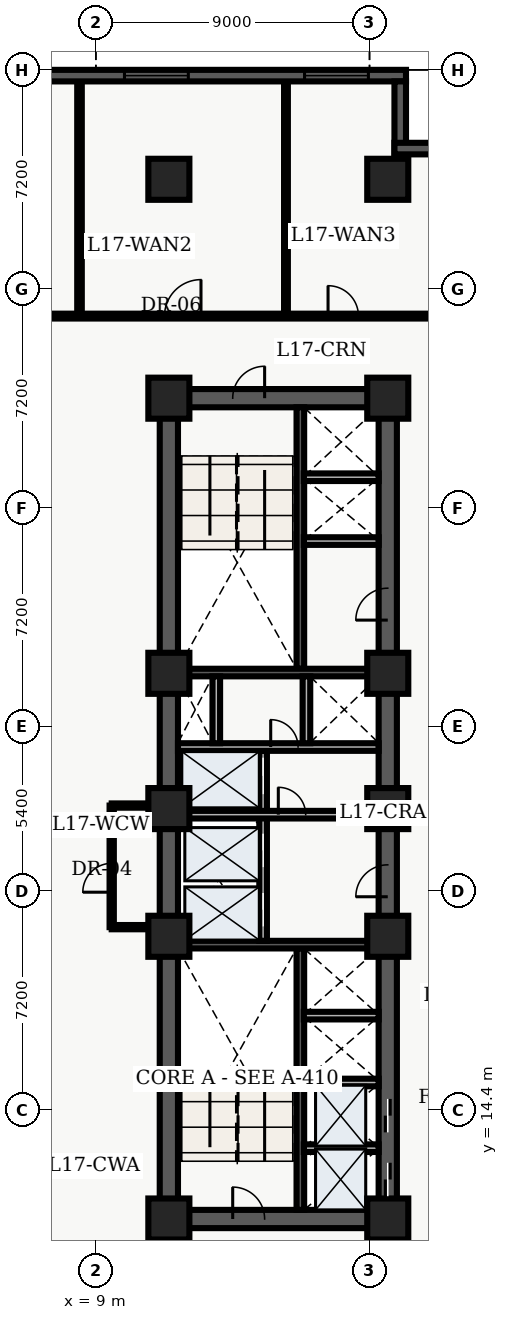
"""IFC4 building model, lengths in metres.
Left out: names, types, materials, properties, quantities, classifications, styles, units other than length and angle.
Written with IfcOpenShell. Run it as: python <this file> out.ifc"""

import sys

from ifc_helpers import new_model, entity, si_unit, converted_unit, direction, frame, origin_with_axes, origin_2d_with_axis, place, context, subcontext, project, spatial, polyline, rectangle, outline, extrude, element, fill, save


model = new_model("IFC4")
c1 = context("Model", 3, precision=1e-05, world=origin_with_axes(), true_north=direction((0.0, 1.0)))
c2 = subcontext(c1, "Body", "Model", "MODEL_VIEW")
j1 = project(units=[si_unit("LENGTHUNIT", "METRE"), converted_unit("PLANEANGLEUNIT", "DEGREE", entity("IfcPlaneAngleMeasure", 0.017), si_unit("PLANEANGLEUNIT", "RADIAN"), dimensions=[0, 0, 0, 0, 0, 0, 0])], contexts=[c1])
p1 = place(None, origin_with_axes())
s1 = spatial("IfcSite", under=j1, at=p1, CompositionType="ELEMENT")
p2 = place(p1, origin_with_axes())
s2 = spatial("IfcBuilding", under=s1, at=p2, CompositionType="ELEMENT")
p3 = place(p2, frame((0.0, 0.0, 71.7), z_axis=(0.0, 0.0, 1.0), x_axis=(1.0, 0.0, 0.0)))
s3 = spatial("IfcBuildingStorey", under=s2, at=p3, CompositionType="ELEMENT", Elevation=71.7)
p4 = place(p3, frame((11.4, 10.8, 0.0), z_axis=(0.0, 0.0, 1.0), x_axis=(0.0, 1.0, 0.0)))
e1 = element("IfcWall", 1, at=p4, inside=s3, PredefinedType="SHEAR", context=c2, shape_type="SweptSolid", body=[
    extrude(outline(polyline([(0.0, -0.3), (27.0, -0.3), (27.0, 0.3), (0.0, 0.3), (0.0, -0.3)])), origin_with_axes(), (0.0, 0.0, 1.0), 3.66),
])
p5 = place(p3, frame((11.4, 10.8, 0.0), z_axis=(0.0, 0.0, 1.0), x_axis=(1.0, 0.0, 0.0)))
e2 = element("IfcWall", 2, at=p5, inside=s3, PredefinedType="SHEAR", context=c2, shape_type="SweptSolid", body=[
    extrude(outline(polyline([(0.0, -0.3), (7.2, -0.3), (7.2, 0.3), (0.0, 0.3), (0.0, -0.3)])), origin_with_axes(), (0.0, 0.0, 1.0), 3.66),
])
p6 = place(p5, frame((2.625, 0.0, 0.0), z_axis=(0.0, 0.0, 1.0), x_axis=(1.0, 0.0, 0.0)))
e3 = element("IfcOpeningElement", 3, at=p6, cuts=e2, PredefinedType="OPENING", context=c2, shape_type="SweptSolid", body=[
    extrude(rectangle(XDim=1.05, YDim=0.62, at=origin_2d_with_axis()), origin_with_axes(), (0.0, 0.0, 1.0), 2.15),
])
p7 = place(p3, frame((11.4, 37.8, 0.0), z_axis=(0.0, 0.0, 1.0), x_axis=(1.0, 0.0, 0.0)))
e4 = element("IfcWall", 4, at=p7, inside=s3, PredefinedType="SHEAR", context=c2, shape_type="SweptSolid", body=[
    extrude(outline(polyline([(0.0, -0.3), (7.2, -0.3), (7.2, 0.3), (0.0, 0.3), (0.0, -0.3)])), origin_with_axes(), (0.0, 0.0, 1.0), 3.66),
])
p8 = place(p7, frame((2.625, 0.0, 0.0), z_axis=(0.0, 0.0, 1.0), x_axis=(1.0, 0.0, 0.0)))
e5 = element("IfcOpeningElement", 5, at=p8, cuts=e4, PredefinedType="OPENING", context=c2, shape_type="SweptSolid", body=[
    extrude(rectangle(XDim=1.05, YDim=0.62, at=origin_2d_with_axis()), origin_with_axes(), (0.0, 0.0, 1.0), 2.15),
])
p9 = place(p3, frame((18.6, 10.8, 0.0), z_axis=(0.0, 0.0, 1.0), x_axis=(0.0, 1.0, 0.0)))
e6 = element("IfcWall", 6, at=p9, inside=s3, PredefinedType="SHEAR", context=c2, shape_type="SweptSolid", body=[
    extrude(outline(polyline([(0.0, -0.3), (13.5, -0.3), (13.5, 0.3), (0.0, 0.3), (0.0, -0.3)])), origin_with_axes(), (0.0, 0.0, 1.0), 3.66),
])
p10 = place(p9, frame((1.3, 0.0, 0.0), z_axis=(0.0, 0.0, 1.0), x_axis=(1.0, 0.0, 0.0)))
e7 = element("IfcOpeningElement", 7, at=p10, cuts=e6, PredefinedType="OPENING", context=c2, shape_type="SweptSolid", body=[
    extrude(rectangle(XDim=1.1, YDim=0.62, at=origin_2d_with_axis()), origin_with_axes(), (0.0, 0.0, 1.0), 2.15),
])
p11 = place(p9, frame((3.4, 0.0, 0.0), z_axis=(0.0, 0.0, 1.0), x_axis=(1.0, 0.0, 0.0)))
e8 = element("IfcOpeningElement", 8, at=p11, cuts=e6, PredefinedType="OPENING", context=c2, shape_type="SweptSolid", body=[
    extrude(rectangle(XDim=1.1, YDim=0.62, at=origin_2d_with_axis()), origin_with_axes(), (0.0, 0.0, 1.0), 2.15),
])
p12 = place(p9, frame((11.125, 0.0, 0.0), z_axis=(0.0, 0.0, 1.0), x_axis=(1.0, 0.0, 0.0)))
e9 = element("IfcOpeningElement", 9, at=p12, cuts=e6, PredefinedType="OPENING", context=c2, shape_type="SweptSolid", body=[
    extrude(rectangle(XDim=1.05, YDim=0.62, at=origin_2d_with_axis()), origin_with_axes(), (0.0, 0.0, 1.0), 2.15),
])
p13 = place(p3, frame((18.6, 24.3, 0.0), z_axis=(0.0, 0.0, 1.0), x_axis=(0.0, 1.0, 0.0)))
e10 = element("IfcWall", 10, at=p13, inside=s3, PredefinedType="SHEAR", context=c2, shape_type="SweptSolid", body=[
    extrude(outline(polyline([(0.0, -0.3), (13.5, -0.3), (13.5, 0.3), (0.0, 0.3), (0.0, -0.3)])), origin_with_axes(), (0.0, 0.0, 1.0), 3.66),
])
p14 = place(p13, frame((6.725, 0.0, 0.0), z_axis=(0.0, 0.0, 1.0), x_axis=(1.0, 0.0, 0.0)))
e11 = element("IfcOpeningElement", 11, at=p14, cuts=e10, PredefinedType="OPENING", context=c2, shape_type="SweptSolid", body=[
    extrude(rectangle(XDim=1.05, YDim=0.62, at=origin_2d_with_axis()), origin_with_axes(), (0.0, 0.0, 1.0), 2.15),
])
p15 = place(p3, frame((15.725, 11.1, 0.0), z_axis=(0.0, 0.0, 1.0), x_axis=(0.0, 1.0, 0.0)))
e12 = element("IfcWall", 12, at=p15, inside=s3, PredefinedType="SHEAR", context=c2, shape_type="SweptSolid", body=[
    extrude(outline(polyline([(0.0, -0.125), (8.6, -0.125), (8.6, 0.125), (0.0, 0.125), (0.0, -0.125)])), origin_with_axes(), (0.0, 0.0, 1.0), 3.66),
])
p16 = place(p3, frame((11.7, 19.825, 0.0), z_axis=(0.0, 0.0, 1.0), x_axis=(1.0, 0.0, 0.0)))
e13 = element("IfcWall", 13, at=p16, inside=s3, PredefinedType="SHEAR", context=c2, shape_type="SweptSolid", body=[
    extrude(outline(polyline([(0.0, -0.125), (6.6, -0.125), (6.6, 0.125), (0.0, 0.125), (0.0, -0.125)])), origin_with_axes(), (0.0, 0.0, 1.0), 3.66),
])
p17 = place(p3, frame((15.725, 28.9, 0.0), z_axis=(0.0, 0.0, 1.0), x_axis=(0.0, 1.0, 0.0)))
e14 = element("IfcWall", 14, at=p17, inside=s3, PredefinedType="SHEAR", context=c2, shape_type="SweptSolid", body=[
    extrude(outline(polyline([(0.0, -0.125), (8.6, -0.125), (8.6, 0.125), (0.0, 0.125), (0.0, -0.125)])), origin_with_axes(), (0.0, 0.0, 1.0), 3.66),
])
p18 = place(p3, frame((11.7, 28.775, 0.0), z_axis=(0.0, 0.0, 1.0), x_axis=(1.0, 0.0, 0.0)))
e15 = element("IfcWall", 15, at=p18, inside=s3, PredefinedType="SHEAR", context=c2, shape_type="SweptSolid", body=[
    extrude(outline(polyline([(0.0, -0.125), (6.6, -0.125), (6.6, 0.125), (0.0, 0.125), (0.0, -0.125)])), origin_with_axes(), (0.0, 0.0, 1.0), 3.66),
])
p19 = place(p3, frame((14.5, 19.95, 0.0), z_axis=(0.0, 0.0, 1.0), x_axis=(0.0, 1.0, 0.0)))
e16 = element("IfcWall", 16, at=p19, inside=s3, PredefinedType="SOLIDWALL", context=c2, shape_type="SweptSolid", body=[
    extrude(outline(polyline([(0.0, -0.125), (6.25, -0.125), (6.25, 0.125), (0.0, 0.125), (0.0, -0.125)])), origin_with_axes(), (0.0, 0.0, 1.0), 2.7),
])
p20 = place(p19, frame((1.025, 0.0, 0.0), z_axis=(0.0, 0.0, 1.0), x_axis=(1.0, 0.0, 0.0)))
e17 = element("IfcOpeningElement", 17, at=p20, cuts=e16, PredefinedType="OPENING", context=c2, shape_type="SweptSolid", body=[
    extrude(rectangle(XDim=1.1, YDim=0.27, at=origin_2d_with_axis()), origin_with_axes(), (0.0, 0.0, 1.0), 2.15),
])
p21 = place(p19, frame((2.975, 0.0, 0.0), z_axis=(0.0, 0.0, 1.0), x_axis=(1.0, 0.0, 0.0)))
e18 = element("IfcOpeningElement", 18, at=p21, cuts=e16, PredefinedType="OPENING", context=c2, shape_type="SweptSolid", body=[
    extrude(rectangle(XDim=1.1, YDim=0.27, at=origin_2d_with_axis()), origin_with_axes(), (0.0, 0.0, 1.0), 2.15),
])
p22 = place(p19, frame((5.425, 0.0, 0.0), z_axis=(0.0, 0.0, 1.0), x_axis=(1.0, 0.0, 0.0)))
e19 = element("IfcOpeningElement", 19, at=p22, cuts=e16, PredefinedType="OPENING", context=c2, shape_type="SweptSolid", body=[
    extrude(rectangle(XDim=1.2, YDim=0.27, at=origin_2d_with_axis()), origin_with_axes(), (0.0, 0.0, 1.0), 2.15),
])
p23 = place(p3, frame((11.7, 24.1, 0.0), z_axis=(0.0, 0.0, 1.0), x_axis=(1.0, 0.0, 0.0)))
e20 = element("IfcWall", 20, at=p23, inside=s3, PredefinedType="SOLIDWALL", context=c2, shape_type="SweptSolid", body=[
    extrude(outline(polyline([(0.0, -0.125), (6.6, -0.125), (6.6, 0.125), (0.0, 0.125), (0.0, -0.125)])), origin_with_axes(), (0.0, 0.0, 1.0), 2.7),
])
p24 = place(p23, frame((3.75, 0.0, 0.0), z_axis=(0.0, 0.0, 1.0), x_axis=(1.0, 0.0, 0.0)))
e21 = element("IfcOpeningElement", 21, at=p24, cuts=e20, PredefinedType="OPENING", context=c2, shape_type="SweptSolid", body=[
    extrude(rectangle(XDim=0.9, YDim=0.27, at=origin_2d_with_axis()), origin_with_axes(), (0.0, 0.0, 1.0), 2.15),
])
p25 = place(p3, frame((11.7, 26.325, 0.0), z_axis=(0.0, 0.0, 1.0), x_axis=(1.0, 0.0, 0.0)))
e22 = element("IfcWall", 22, at=p25, inside=s3, PredefinedType="SOLIDWALL", context=c2, shape_type="SweptSolid", body=[
    extrude(outline(polyline([(0.0, -0.125), (6.6, -0.125), (6.6, 0.125), (0.0, 0.125), (0.0, -0.125)])), origin_with_axes(), (0.0, 0.0, 1.0), 2.7),
])
p26 = place(p25, frame((3.5, 0.0, 0.0), z_axis=(0.0, 0.0, 1.0), x_axis=(1.0, 0.0, 0.0)))
e23 = element("IfcOpeningElement", 23, at=p26, cuts=e22, PredefinedType="OPENING", context=c2, shape_type="SweptSolid", body=[
    extrude(rectangle(XDim=0.9, YDim=0.27, at=origin_2d_with_axis()), origin_with_axes(), (0.0, 0.0, 1.0), 2.15),
])
for number, where, z_axis, x_axis in (
    (24, (12.96, 26.45, 0.0), (0.0, 0.0, 1.0), (0.0, 1.0, 0.0)),
    (25, (15.925, 26.45, 0.0), (0.0, 0.0, 1.0), (0.0, 1.0, 0.0)),
):
    element("IfcWall", number, at=place(p3, frame(where, z_axis=z_axis, x_axis=x_axis)), inside=s3, PredefinedType="SOLIDWALL", context=c2, shape_type="SweptSolid", body=[
        extrude(outline(polyline([(0.0, -0.125), (2.2, -0.125), (2.2, 0.125), (0.0, 0.125), (0.0, -0.125)])), origin_with_axes(), (0.0, 0.0, 1.0), 2.7),
    ])
for number, where, z_axis, x_axis in (
    (26, (11.4, 10.8, 0.0), (0.0, 0.0, 1.0), (1.0, 0.0, 0.0)),
    (27, (11.4, 20.1, 0.0), (0.0, 0.0, 1.0), (1.0, 0.0, 0.0)),
    (28, (11.4, 24.3, 0.0), (0.0, 0.0, 1.0), (1.0, 0.0, 0.0)),
    (29, (11.4, 28.75, 0.0), (0.0, 0.0, 1.0), (1.0, 0.0, 0.0)),
    (30, (11.4, 37.8, 0.0), (0.0, 0.0, 1.0), (1.0, 0.0, 0.0)),
    (31, (11.4, 45.0, 0.0), (0.0, 0.0, 1.0), (1.0, 0.0, 0.0)),
    (32, (18.6, 10.8, 0.0), (0.0, 0.0, 1.0), (1.0, 0.0, 0.0)),
    (33, (18.6, 20.1, 0.0), (0.0, 0.0, 1.0), (1.0, 0.0, 0.0)),
    (34, (18.6, 24.3, 0.0), (0.0, 0.0, 1.0), (1.0, 0.0, 0.0)),
    (35, (18.6, 28.75, 0.0), (0.0, 0.0, 1.0), (1.0, 0.0, 0.0)),
    (36, (18.6, 37.8, 0.0), (0.0, 0.0, 1.0), (1.0, 0.0, 0.0)),
    (37, (18.6, 45.0, 0.0), (0.0, 0.0, 1.0), (1.0, 0.0, 0.0)),
):
    element("IfcColumn", number, at=place(p3, frame(where, z_axis=z_axis, x_axis=x_axis)), inside=s3, PredefinedType="COLUMN", context=c2, shape_type="SweptSolid", body=[
        extrude(rectangle(XDim=1.35, YDim=1.35, at=origin_2d_with_axis()), origin_with_axes(), (0.0, 0.0, 1.0), 3.9),
    ])
for number, where, z_axis, x_axis in (
    (38, (15.84, 13.13, 0.0), (0.0, 0.0, 1.0), (1.0, 0.0, 0.0)),
    (39, (15.84, 15.29, 0.0), (0.0, 0.0, 1.0), (1.0, 0.0, 0.0)),
    (40, (15.84, 17.49, 0.0), (0.0, 0.0, 1.0), (1.0, 0.0, 0.0)),
    (41, (15.84, 33.1, 0.0), (0.0, 0.0, 1.0), (1.0, 0.0, 0.0)),
    (42, (15.84, 35.2, 0.0), (0.0, 0.0, 1.0), (1.0, 0.0, 0.0)),
):
    element("IfcWall", number, at=place(p3, frame(where, z_axis=z_axis, x_axis=x_axis)), inside=s3, PredefinedType="SOLIDWALL", context=c2, shape_type="SweptSolid", body=[
        extrude(outline(polyline([(0.0, -0.125), (2.46, -0.125), (2.46, 0.125), (0.0, 0.125), (0.0, -0.125)])), origin_with_axes(), (0.0, 0.0, 1.0), 2.7),
    ])
p27 = place(p3, frame((9.52, 20.4, 0.0), z_axis=(0.0, 0.0, 1.0), x_axis=(0.0, 1.0, 0.0)))
e43 = element("IfcWall", 43, at=p27, inside=s3, PredefinedType="PARTITIONING", context=c2, shape_type="SweptSolid", body=[
    extrude(outline(polyline([(0.0, -0.07), (4.0, -0.07), (4.0, 0.07), (0.0, 0.07), (0.0, -0.07)])), origin_with_axes(), (0.0, 0.0, 1.0), 2.7),
])
p28 = place(p27, frame((1.625, 0.0, 0.0), z_axis=(0.0, 0.0, 1.0), x_axis=(1.0, 0.0, 0.0)))
e44 = element("IfcOpeningElement", 44, at=p28, cuts=e43, PredefinedType="OPENING", context=c2, shape_type="SweptSolid", body=[
    extrude(rectangle(XDim=0.95, YDim=0.16, at=origin_2d_with_axis()), origin_with_axes(), (0.0, 0.0, 1.0), 2.15),
])
for number, where, z_axis, x_axis in (
    (45, (9.52, 20.4, 0.0), (0.0, 0.0, 1.0), (1.0, 0.0, 0.0)),
    (46, (9.52, 24.4, 0.0), (0.0, 0.0, 1.0), (1.0, 0.0, 0.0)),
):
    element("IfcWall", number, at=place(p3, frame(where, z_axis=z_axis, x_axis=x_axis)), inside=s3, PredefinedType="PARTITIONING", context=c2, shape_type="SweptSolid", body=[
        extrude(outline(polyline([(0.0, -0.07), (1.58, -0.07), (1.58, 0.07), (0.0, 0.07), (0.0, -0.07)])), origin_with_axes(), (0.0, 0.0, 1.0), 2.7),
    ])
p29 = place(p3, frame((2.6, 40.5, 0.0), z_axis=(0.0, 0.0, 1.0), x_axis=(1.0, 0.0, 0.0)))
e47 = element("IfcWall", 47, at=p29, inside=s3, PredefinedType="PARTITIONING", context=c2, shape_type="SweptSolid", body=[
    extrude(outline(polyline([(0.0, -0.08), (18.65, -0.08), (18.65, 0.08), (0.0, 0.08), (0.0, -0.08)])), origin_with_axes(), (0.0, 0.0, 1.0), 2.7),
])
p30 = place(p29, frame((4.176, 0.0, 0.0), z_axis=(0.0, 0.0, 1.0), x_axis=(1.0, 0.0, 0.0)))
e48 = element("IfcOpeningElement", 48, at=p30, cuts=e47, PredefinedType="OPENING", context=c2, shape_type="SweptSolid", body=[
    extrude(rectangle(XDim=1.0, YDim=0.18, at=origin_2d_with_axis()), origin_with_axes(), (0.0, 0.0, 1.0), 2.15),
])
p31 = place(p29, frame((9.257, 0.0, 0.0), z_axis=(0.0, 0.0, 1.0), x_axis=(1.0, 0.0, 0.0)))
e49 = element("IfcOpeningElement", 49, at=p31, cuts=e47, PredefinedType="OPENING", context=c2, shape_type="SweptSolid", body=[
    extrude(rectangle(XDim=1.2, YDim=0.18, at=origin_2d_with_axis()), origin_with_axes(), (0.0, 0.0, 1.0), 2.2),
])
p32 = place(p29, frame((14.536, 0.0, 0.0), z_axis=(0.0, 0.0, 1.0), x_axis=(1.0, 0.0, 0.0)))
e50 = element("IfcOpeningElement", 50, at=p32, cuts=e47, PredefinedType="OPENING", context=c2, shape_type="SweptSolid", body=[
    extrude(rectangle(XDim=1.0, YDim=0.18, at=origin_2d_with_axis()), origin_with_axes(), (0.0, 0.0, 1.0), 2.15),
])
p33 = place(p3, frame((8.461, 40.6, 0.0), z_axis=(0.0, 0.0, 1.0), x_axis=(0.0, 1.0, 0.0)))
e51 = element("IfcWall", 51, at=p33, inside=s3, PredefinedType="PARTITIONING", context=c2, shape_type="SweptSolid", body=[
    extrude(outline(polyline([(0.0, -0.075), (7.64, -0.075), (7.64, 0.075), (0.0, 0.075), (0.0, -0.075)])), origin_with_axes(), (0.0, 0.0, 1.0), 2.7),
])
p34 = place(p3, frame((15.252, 40.6, 0.0), z_axis=(0.0, 0.0, 1.0), x_axis=(0.0, 1.0, 0.0)))
e52 = element("IfcWall", 52, at=p34, inside=s3, PredefinedType="PARTITIONING", context=c2, shape_type="SweptSolid", body=[
    extrude(outline(polyline([(0.0, -0.062), (7.64, -0.062), (7.64, 0.062), (0.0, 0.062), (0.0, -0.062)])), origin_with_axes(), (0.0, 0.0, 1.0), 2.7),
])
p35 = place(p3, frame((2.78, 48.41, 0.0), z_axis=(0.0, 0.0, 1.0), x_axis=(1.0, 0.0, 0.0)))
e53 = element("IfcWall", 53, at=p35, inside=s3, PredefinedType="SOLIDWALL", context=c2, shape_type="SweptSolid", body=[
    extrude(outline(polyline([(0.0, -0.19), (16.42, -0.19), (16.42, 0.19), (0.0, 0.19), (0.0, -0.19)])), origin_with_axes(), (0.0, 0.0, 1.0), 3.66),
])
p36 = place(p35, frame((3.137, 0.0, 0.45), z_axis=(0.0, 0.0, 1.0), x_axis=(1.0, 0.0, 0.0)))
e54 = element("IfcOpeningElement", 54, at=p36, cuts=e53, PredefinedType="OPENING", context=c2, shape_type="SweptSolid", body=[
    extrude(rectangle(XDim=2.1, YDim=0.4, at=origin_2d_with_axis()), origin_with_axes(), (0.0, 0.0, 1.0), 2.2),
])
p37 = place(p35, frame((8.21, 0.0, 0.45), z_axis=(0.0, 0.0, 1.0), x_axis=(1.0, 0.0, 0.0)))
e55 = element("IfcOpeningElement", 55, at=p37, cuts=e53, PredefinedType="OPENING", context=c2, shape_type="SweptSolid", body=[
    extrude(rectangle(XDim=2.1, YDim=0.4, at=origin_2d_with_axis()), origin_with_axes(), (0.0, 0.0, 1.0), 2.2),
])
p38 = place(p35, frame((14.133, 0.0, 0.45), z_axis=(0.0, 0.0, 1.0), x_axis=(1.0, 0.0, 0.0)))
e56 = element("IfcOpeningElement", 56, at=p38, cuts=e53, PredefinedType="OPENING", context=c2, shape_type="SweptSolid", body=[
    extrude(rectangle(XDim=2.1, YDim=0.4, at=origin_2d_with_axis()), origin_with_axes(), (0.0, 0.0, 1.0), 2.2),
])
p39 = place(p3, frame((19.01, 48.22, 0.0), z_axis=(0.0, 0.0, 1.0), x_axis=(0.0, -1.0, 0.0)))
e57 = element("IfcWall", 57, at=p39, inside=s3, PredefinedType="SOLIDWALL", context=c2, shape_type="SweptSolid", body=[
    extrude(outline(polyline([(0.0, -0.19), (2.56, -0.19), (2.56, 0.19), (0.0, 0.19), (0.0, -0.19)])), origin_with_axes(), (0.0, 0.0, 1.0), 3.66),
])
p40 = place(p3, frame((18.82, 46.01, 0.0), z_axis=(0.0, 0.0, 1.0), x_axis=(1.0, 0.0, 0.0)))
e58 = element("IfcWall", 58, at=p40, inside=s3, PredefinedType="SOLIDWALL", context=c2, shape_type="SweptSolid", body=[
    extrude(outline(polyline([(0.0, -0.19), (2.78, -0.19), (2.78, 0.19), (0.0, 0.19), (0.0, -0.19)])), origin_with_axes(), (0.0, 0.0, 1.0), 3.66),
])
p41 = place(p9, frame((1.3, 0.0, 0.0), z_axis=(0.0, 0.0, 1.0), x_axis=(1.0, 0.0, 0.0)))
e59 = element("IfcDoor", 59, at=p41, inside=s3, OperationType="SLIDING_TO_LEFT", PredefinedType="DOOR", context=c2, shape_type="SweptSolid", body=[
    extrude(rectangle(XDim=1.1, YDim=0.09, at=origin_2d_with_axis()), origin_with_axes(), (0.0, 0.0, 1.0), 2.15),
])
fill(e7, e59)
p42 = place(p9, frame((3.4, 0.0, 0.0), z_axis=(0.0, 0.0, 1.0), x_axis=(1.0, 0.0, 0.0)))
e60 = element("IfcDoor", 60, at=p42, inside=s3, OperationType="SLIDING_TO_RIGHT", PredefinedType="DOOR", context=c2, shape_type="SweptSolid", body=[
    extrude(rectangle(XDim=1.1, YDim=0.09, at=origin_2d_with_axis()), origin_with_axes(), (0.0, 0.0, 1.0), 2.15),
])
fill(e8, e60)
p43 = place(p19, frame((1.025, 0.0, 0.0), z_axis=(0.0, 0.0, 1.0), x_axis=(1.0, 0.0, 0.0)))
e61 = element("IfcDoor", 61, at=p43, inside=s3, OperationType="SLIDING_TO_LEFT", PredefinedType="DOOR", context=c2, shape_type="SweptSolid", body=[
    extrude(rectangle(XDim=1.1, YDim=0.09, at=origin_2d_with_axis()), origin_with_axes(), (0.0, 0.0, 1.0), 2.15),
])
fill(e17, e61)
p44 = place(p19, frame((2.975, 0.0, 0.0), z_axis=(0.0, 0.0, 1.0), x_axis=(1.0, 0.0, 0.0)))
e62 = element("IfcDoor", 62, at=p44, inside=s3, OperationType="SLIDING_TO_RIGHT", PredefinedType="DOOR", context=c2, shape_type="SweptSolid", body=[
    extrude(rectangle(XDim=1.1, YDim=0.09, at=origin_2d_with_axis()), origin_with_axes(), (0.0, 0.0, 1.0), 2.15),
])
fill(e18, e62)
p45 = place(p19, frame((5.425, 0.0, 0.0), z_axis=(0.0, 0.0, 1.0), x_axis=(1.0, 0.0, 0.0)))
e63 = element("IfcDoor", 63, at=p45, inside=s3, OperationType="DOUBLE_DOOR_SLIDING", PredefinedType="DOOR", context=c2, shape_type="SweptSolid", body=[
    extrude(rectangle(XDim=1.2, YDim=0.09, at=origin_2d_with_axis()), origin_with_axes(), (0.0, 0.0, 1.0), 2.15),
])
fill(e19, e63)
p46 = place(p5, frame((2.625, 0.0, 0.0), z_axis=(0.0, 0.0, 1.0), x_axis=(1.0, 0.0, 0.0)))
e64 = element("IfcDoor", 64, at=p46, inside=s3, OperationType="SINGLE_SWING_LEFT", PredefinedType="DOOR", context=c2, shape_type="SweptSolid", body=[
    extrude(rectangle(XDim=1.05, YDim=0.09, at=origin_2d_with_axis()), origin_with_axes(), (0.0, 0.0, 1.0), 2.15),
])
fill(e3, e64)
p47 = place(p7, frame((2.625, 0.0, 0.0), z_axis=(0.0, 0.0, 1.0), x_axis=(1.0, 0.0, 0.0)))
e65 = element("IfcDoor", 65, at=p47, inside=s3, OperationType="SINGLE_SWING_RIGHT", PredefinedType="DOOR", context=c2, shape_type="SweptSolid", body=[
    extrude(rectangle(XDim=1.05, YDim=0.09, at=origin_2d_with_axis()), origin_with_axes(), (0.0, 0.0, 1.0), 2.15),
])
fill(e5, e65)
p48 = place(p9, frame((11.125, 0.0, 0.0), z_axis=(0.0, 0.0, 1.0), x_axis=(1.0, 0.0, 0.0)))
e66 = element("IfcDoor", 66, at=p48, inside=s3, OperationType="SINGLE_SWING_LEFT", PredefinedType="DOOR", context=c2, shape_type="SweptSolid", body=[
    extrude(rectangle(XDim=1.05, YDim=0.09, at=origin_2d_with_axis()), origin_with_axes(), (0.0, 0.0, 1.0), 2.15),
])
fill(e9, e66)
p49 = place(p23, frame((3.75, 0.0, 0.0), z_axis=(0.0, 0.0, 1.0), x_axis=(1.0, 0.0, 0.0)))
e67 = element("IfcDoor", 67, at=p49, inside=s3, OperationType="SINGLE_SWING_LEFT", PredefinedType="DOOR", context=c2, shape_type="SweptSolid", body=[
    extrude(rectangle(XDim=0.9, YDim=0.09, at=origin_2d_with_axis()), origin_with_axes(), (0.0, 0.0, 1.0), 2.15),
])
fill(e21, e67)
p50 = place(p25, frame((3.5, 0.0, 0.0), z_axis=(0.0, 0.0, 1.0), x_axis=(1.0, 0.0, 0.0)))
e68 = element("IfcDoor", 68, at=p50, inside=s3, OperationType="SINGLE_SWING_LEFT", PredefinedType="DOOR", context=c2, shape_type="SweptSolid", body=[
    extrude(rectangle(XDim=0.9, YDim=0.09, at=origin_2d_with_axis()), origin_with_axes(), (0.0, 0.0, 1.0), 2.15),
])
fill(e23, e68)
p51 = place(p13, frame((6.725, 0.0, 0.0), z_axis=(0.0, 0.0, 1.0), x_axis=(1.0, 0.0, 0.0)))
e69 = element("IfcDoor", 69, at=p51, inside=s3, OperationType="SINGLE_SWING_LEFT", PredefinedType="DOOR", context=c2, shape_type="SweptSolid", body=[
    extrude(rectangle(XDim=1.05, YDim=0.09, at=origin_2d_with_axis()), origin_with_axes(), (0.0, 0.0, 1.0), 2.15),
])
fill(e11, e69)
p52 = place(p27, frame((1.625, 0.0, 0.0), z_axis=(0.0, 0.0, 1.0), x_axis=(1.0, 0.0, 0.0)))
e70 = element("IfcDoor", 70, at=p52, inside=s3, OperationType="SINGLE_SWING_LEFT", PredefinedType="DOOR", context=c2, shape_type="SweptSolid", body=[
    extrude(rectangle(XDim=0.95, YDim=0.084, at=origin_2d_with_axis()), origin_with_axes(), (0.0, 0.0, 1.0), 2.15),
])
fill(e44, e70)
p53 = place(p29, frame((9.257, 0.0, 0.0), z_axis=(0.0, 0.0, 1.0), x_axis=(1.0, 0.0, 0.0)))
e71 = element("IfcDoor", 71, at=p53, inside=s3, OperationType="SINGLE_SWING_RIGHT", PredefinedType="DOOR", context=c2, shape_type="SweptSolid", body=[
    extrude(rectangle(XDim=1.2, YDim=0.09, at=origin_2d_with_axis()), origin_with_axes(), (0.0, 0.0, 1.0), 2.2),
])
fill(e49, e71)
p54 = place(p29, frame((14.536, 0.0, 0.0), z_axis=(0.0, 0.0, 1.0), x_axis=(1.0, 0.0, 0.0)))
e72 = element("IfcDoor", 72, at=p54, inside=s3, OperationType="SINGLE_SWING_LEFT", PredefinedType="DOOR", context=c2, shape_type="SweptSolid", body=[
    extrude(rectangle(XDim=1.0, YDim=0.09, at=origin_2d_with_axis()), origin_with_axes(), (0.0, 0.0, 1.0), 2.15),
])
fill(e50, e72)
p55 = place(p35, frame((8.21, 0.0, 0.45), z_axis=(0.0, 0.0, 1.0), x_axis=(1.0, 0.0, 0.0)))
e73 = element("IfcWindow", 73, at=p55, inside=s3, PredefinedType="WINDOW", context=c2, shape_type="SweptSolid", body=[
    extrude(rectangle(XDim=2.1, YDim=0.09, at=origin_2d_with_axis()), origin_with_axes(), (0.0, 0.0, 1.0), 2.2),
])
fill(e55, e73)
p56 = place(p35, frame((14.133, 0.0, 0.45), z_axis=(0.0, 0.0, 1.0), x_axis=(1.0, 0.0, 0.0)))
e74 = element("IfcWindow", 74, at=p56, inside=s3, PredefinedType="WINDOW", context=c2, shape_type="SweptSolid", body=[
    extrude(rectangle(XDim=2.1, YDim=0.09, at=origin_2d_with_axis()), origin_with_axes(), (0.0, 0.0, 1.0), 2.2),
])
fill(e56, e74)
save(model, sys.argv[1])
